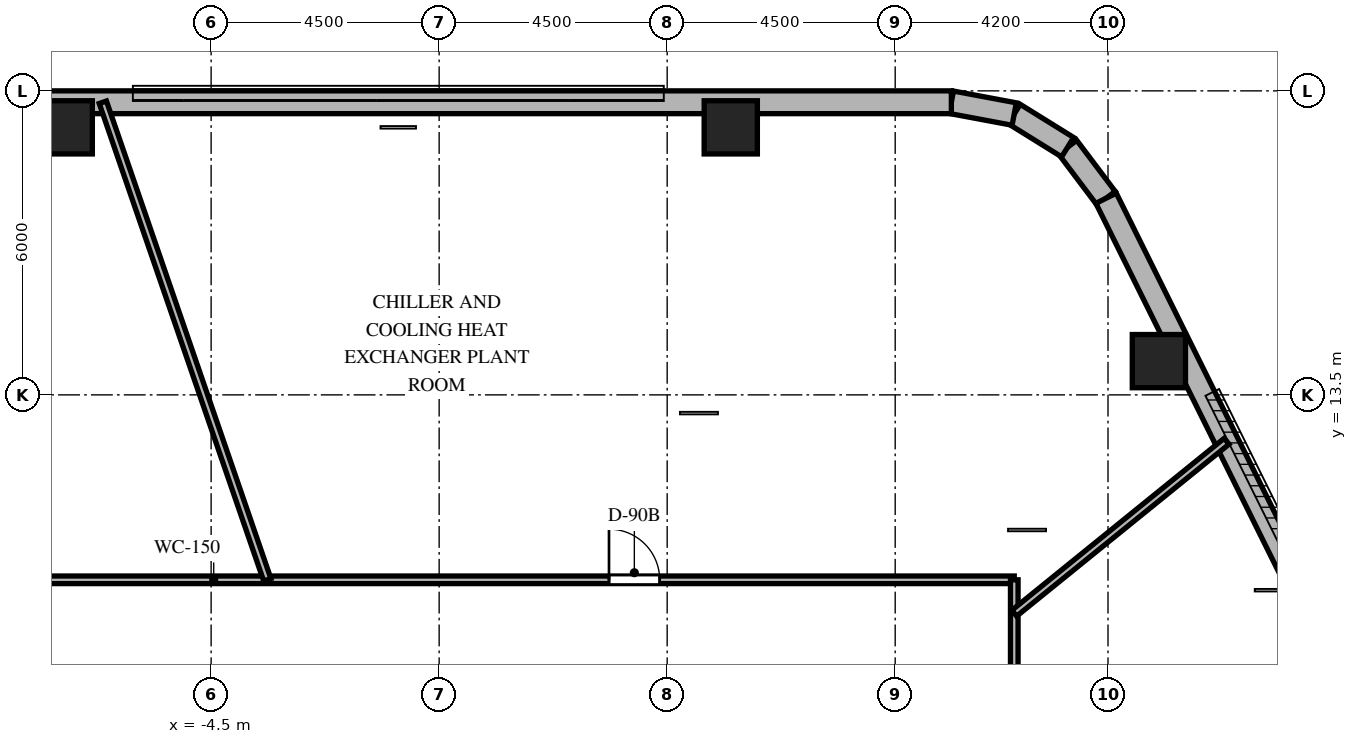
"""IFC4 building model, lengths in metres.
Left out: names, types, materials, properties, quantities, classifications, styles, units other than length and angle.
Written with IfcOpenShell. Run it as: python <this file> out.ifc"""

import sys

from ifc_helpers import new_model, si_unit, direction, frame, frame_2d, origin, origin_2d, place, context, subcontext, project, spatial, rectangle, extrude, element, fill, save


model = new_model("IFC4")
c1 = context("Model", 3, precision=1e-05, world=origin(), true_north=direction((0.0, 1.0)))
c2 = subcontext(c1, "Body", "Model", "MODEL_VIEW")
j1 = project(units=[si_unit("LENGTHUNIT", "METRE"), si_unit("PLANEANGLEUNIT", "RADIAN")], contexts=[c1])
p1 = place(None, origin())
s1 = spatial("IfcSite", under=j1, at=p1, CompositionType="ELEMENT")
p2 = place(p1, origin())
s2 = spatial("IfcBuilding", under=s1, at=p2, CompositionType="ELEMENT")
p3 = place(p2, frame((0.0, 0.0, 170.2)))
s3 = spatial("IfcBuildingStorey", under=s2, at=p3, CompositionType="ELEMENT", Elevation=170.2)
for number, where, z_axis, x_axis in (
    (1, (14.204, 14.166, 0.0), (0.0, 0.0, 1.0), (1.0, 0.0, 0.0)),
    (2, (5.755, 18.78, 0.0), (0.0, 0.0, 1.0), (1.0, 0.0, 0.0)),
    (3, (-7.369, 18.78, 0.0), (0.0, 0.0, 1.0), (1.0, 0.0, 0.0)),
):
    element("IfcColumn", number, at=place(p3, frame(where, z_axis=z_axis, x_axis=x_axis)), inside=s3, PredefinedType="COLUMN", context=c2, shape_type="SweptSolid", body=[
        extrude(rectangle(XDim=1.05, YDim=1.05, at=origin_2d()), origin(), (0.0, 0.0, 1.0), 5.4),
    ])
p4 = place(p3, frame((13.162, 17.381, 0.0), z_axis=(0.0, 0.0, 1.0), x_axis=(-0.601515770517, 0.798860925205, 0.0)))
e4 = element("IfcWall", 4, at=p4, inside=s3, PredefinedType="SOLIDWALL", context=c2, shape_type="SweptSolid", body=[
    extrude(rectangle(XDim=1.262, YDim=0.45, at=frame_2d((0.631, 0.0))), origin(), (0.0, 0.0, 1.0), 5.1),
])
p5 = place(p3, frame((12.403, 18.389, 0.0), z_axis=(0.0, 0.0, 1.0), x_axis=(-0.849795170926, 0.527113049991, 0.0)))
e5 = element("IfcWall", 5, at=p5, inside=s3, PredefinedType="SOLIDWALL", context=c2, shape_type="SweptSolid", body=[
    extrude(rectangle(XDim=1.241, YDim=0.45, at=frame_2d((0.62, 0.0))), origin(), (0.0, 0.0, 1.0), 5.1),
])
p6 = place(p3, frame((11.349, 19.043, 0.0), z_axis=(0.0, 0.0, 1.0), x_axis=(-0.982931267051, 0.183973161772, 0.0)))
e6 = element("IfcWall", 6, at=p6, inside=s3, PredefinedType="SOLIDWALL", context=c2, shape_type="SweptSolid", body=[
    extrude(rectangle(XDim=1.262, YDim=0.45, at=frame_2d((0.631, 0.0))), origin(), (0.0, 0.0, 1.0), 5.1),
])
p7 = place(p3, frame((20.618, 2.344, 0.0), z_axis=(0.0, 0.0, 1.0), x_axis=(-0.444243691097, 0.895905990002, 0.0)))
e7 = element("IfcWall", 7, at=p7, inside=s3, PredefinedType="SOLIDWALL", context=c2, shape_type="SweptSolid", body=[
    extrude(rectangle(XDim=16.784, YDim=0.45, at=frame_2d((8.392, 0.0))), origin(), (0.0, 0.0, 1.0), 5.1),
])
p8 = place(p3, frame((10.108, 19.275, 0.0), z_axis=(0.0, 0.0, 1.0), x_axis=(-1.0, 0.0, 0.0)))
e8 = element("IfcWall", 8, at=p8, inside=s3, PredefinedType="SOLIDWALL", context=c2, shape_type="SweptSolid", body=[
    extrude(rectangle(XDim=21.829, YDim=0.45, at=frame_2d((10.915, 0.0))), origin(), (0.0, 0.0, 1.0), 5.1),
])
p9 = place(p3, frame((-11.35, 9.85, 0.0), z_axis=(0.0, 0.0, 1.0), x_axis=(1.0, 0.0, 0.0)))
e9 = element("IfcWall", 9, at=p9, inside=s3, PredefinedType="PARTITIONING", context=c2, shape_type="SweptSolid", body=[
    extrude(rectangle(XDim=22.7, YDim=0.15, at=frame_2d((11.35, 0.0))), origin(), (0.0, 0.0, 1.0), 4.316),
])
p10 = place(p9, frame((14.702, 0.0, 0.0)))
e10 = element("IfcOpeningElement", 10, at=p10, cuts=e9, PredefinedType="OPENING", context=c2, shape_type="SweptSolid", body=[
    extrude(rectangle(XDim=1.0, YDim=2.15, at=frame_2d((0.5, 1.075))), frame((0.0, 0.085, 0.0), z_axis=(0.0, -1.0, 0.0), x_axis=(1.0, 0.0, 0.0)), (0.0, 0.0, 1.0), 0.17),
])
p11 = place(p3, frame((11.35, 9.85, 0.0), z_axis=(0.0, 0.0, 1.0), x_axis=(0.0, -1.0, 0.0)))
e11 = element("IfcWall", 11, at=p11, inside=s3, PredefinedType="PARTITIONING", context=c2, shape_type="SweptSolid", body=[
    extrude(rectangle(XDim=19.7, YDim=0.15, at=frame_2d((9.85, 0.0))), origin(), (0.0, 0.0, 1.0), 4.316),
])
p12 = place(p11, frame((7.825, 0.0, 0.0)))
e12 = element("IfcOpeningElement", 12, at=p12, cuts=e11, PredefinedType="OPENING", context=c2, shape_type="SweptSolid", body=[
    extrude(rectangle(XDim=1.05, YDim=2.15, at=frame_2d((0.525, 1.075))), frame((0.0, 0.085, 0.0), z_axis=(0.0, -1.0, 0.0), x_axis=(1.0, 0.0, 0.0)), (0.0, 0.0, 1.0), 0.17),
])
p13 = place(p11, frame((11.446, 0.0, 0.0)))
e13 = element("IfcOpeningElement", 13, at=p13, cuts=e11, PredefinedType="OPENING", context=c2, shape_type="SweptSolid", body=[
    extrude(rectangle(XDim=1.0, YDim=2.15, at=frame_2d((0.5, 1.075))), frame((0.0, 0.085, 0.0), z_axis=(0.0, -1.0, 0.0), x_axis=(1.0, 0.0, 0.0)), (0.0, 0.0, 1.0), 0.17),
])
p14 = place(p3, frame((11.35, 9.191, 0.0), z_axis=(0.0, 0.0, 1.0), x_axis=(0.777126765843, 0.62934409492, 0.0)))
e14 = element("IfcWall", 14, at=p14, inside=s3, PredefinedType="PARTITIONING", context=c2, shape_type="SweptSolid", body=[
    extrude(rectangle(XDim=5.392, YDim=0.15, at=frame_2d((2.696, 0.0))), origin(), (0.0, 0.0, 1.0), 4.34),
])
p15 = place(p3, frame((-3.392, 9.85, 0.0), z_axis=(0.0, 0.0, 1.0), x_axis=(-0.325580784727, 0.945514226554, 0.0)))
e15 = element("IfcWall", 15, at=p15, inside=s3, PredefinedType="PARTITIONING", context=c2, shape_type="SweptSolid", body=[
    extrude(rectangle(XDim=9.968, YDim=0.15, at=frame_2d((4.984, 0.0))), origin(), (0.0, 0.0, 1.0), 4.34),
])
p16 = place(p10, origin())
e16 = element("IfcDoor", 16, at=p16, inside=s3, OperationType="SINGLE_SWING_LEFT", PredefinedType="DOOR", context=c2, shape_type="SweptSolid", body=[
    extrude(rectangle(XDim=1.0, YDim=2.15, at=frame_2d((0.5, 1.075))), frame((0.0, 0.025, 0.0), z_axis=(0.0, -1.0, 0.0), x_axis=(1.0, 0.0, 0.0)), (0.0, 0.0, 1.0), 0.05),
])
fill(e10, e16)
save(model, sys.argv[1])
